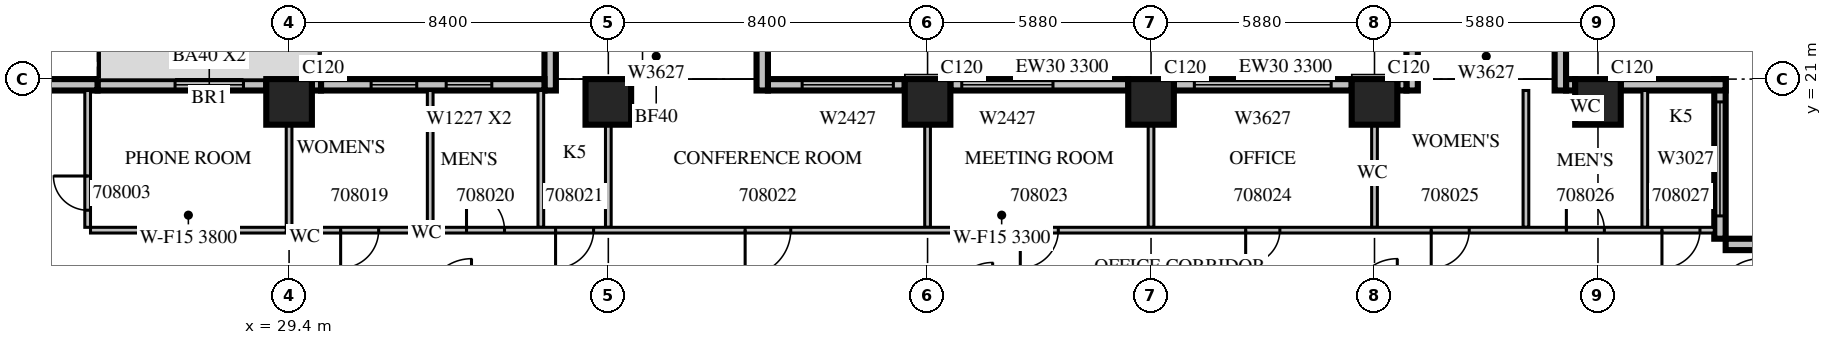
"""IFC4 building model, lengths in metres.
Left out: names, types, materials, properties, quantities, classifications, styles, units other than length and angle.
Written with IfcOpenShell. Run it as: python <this file> out.ifc"""

import sys

from ifc_helpers import new_model, si_unit, direction, frame, frame_2d, origin, origin_2d, place, context, subcontext, project, spatial, rectangle, extrude, source, transform, mapped, element, fill, save


model = new_model("IFC4")
c1 = context("Model", 3, precision=1e-05, world=origin(), true_north=direction((0.0, 1.0)))
c2 = subcontext(c1, "Body", "Model", "MODEL_VIEW")
j1 = project(units=[si_unit("LENGTHUNIT", "METRE"), si_unit("PLANEANGLEUNIT", "RADIAN")], contexts=[c1])
p1 = place(None, origin())
s1 = spatial("IfcSite", under=j1, at=p1, CompositionType="ELEMENT")
p2 = place(p1, origin())
s2 = spatial("IfcBuilding", under=s1, at=p2, CompositionType="ELEMENT")
p3 = place(p2, frame((0.0, 0.0, 44.7)))
s3 = spatial("IfcBuildingStorey", under=s2, at=p3, CompositionType="ELEMENT", Elevation=44.7)
m1 = source(origin(), c2, "Body", "SweptSolid", [
    extrude(rectangle(XDim=1.2, YDim=1.2, at=origin_2d()), origin(), (0.0, 0.0, 1.0), 4.2),
])
for number, where, z_axis, x_axis in (
    (1, (29.4, 20.4, 0.0), (0.0, 0.0, 1.0), (1.0, 0.0, 0.0)),
    (2, (37.8, 20.4, 0.0), (0.0, 0.0, 1.0), (1.0, 0.0, 0.0)),
    (3, (46.2, 20.4, 0.0), (0.0, 0.0, 1.0), (1.0, 0.0, 0.0)),
    (4, (52.08, 20.4, 0.0), (0.0, 0.0, 1.0), (1.0, 0.0, 0.0)),
    (5, (57.96, 20.4, 0.0), (0.0, 0.0, 1.0), (1.0, 0.0, 0.0)),
    (6, (63.84, 20.4, 0.0), (0.0, 0.0, 1.0), (1.0, 0.0, 0.0)),
):
    element("IfcColumn", number, at=place(p3, frame(where, z_axis=z_axis, x_axis=x_axis)), inside=s3, PredefinedType="COLUMN", context=c2, shape_type="MappedRepresentation", body=[
        mapped(m1, transform((0.0, 0.0, 0.0), scale=1.0)),
    ])
m2 = source(origin(), c2, "Body", "SweptSolid", [
    extrude(rectangle(XDim=4.2, YDim=0.3, at=frame_2d((2.1, 0.0))), origin(), (0.0, 0.0, 1.0), 3.8),
])
p4 = place(p3, frame((71.4, 16.65, 0.0), z_axis=(0.0, 0.0, 1.0), x_axis=(-1.0, 0.0, 0.0)))
e7 = element("IfcWall", 7, at=p4, inside=s3, PredefinedType="STANDARD", context=c2, shape_type="MappedRepresentation", body=[
    mapped(m2, transform((0.0, 0.0, 0.0), scale=1.0)),
])
m3 = source(origin(), c2, "Body", "SweptSolid", [
    extrude(rectangle(XDim=1.2, YDim=2.7, at=frame_2d((0.6, 1.35))), frame((0.0, 0.16, 0.0), z_axis=(0.0, -1.0, 0.0), x_axis=(1.0, 0.0, 0.0)), (0.0, 0.0, 1.0), 0.32),
])
p5 = place(p4, frame((0.66, 0.0, 0.6)))
e8 = element("IfcOpeningElement", 8, at=p5, cuts=e7, PredefinedType="OPENING", context=c2, shape_type="MappedRepresentation", body=[
    mapped(m3, transform((0.0, 0.0, 0.0), scale=1.0)),
])
p6 = place(p3, frame((67.05, 16.8, 0.0), z_axis=(0.0, 0.0, 1.0), x_axis=(0.0, 1.0, 0.0)))
e9 = element("IfcWall", 9, at=p6, inside=s3, PredefinedType="STANDARD", context=c2, shape_type="MappedRepresentation", body=[
    mapped(m2, transform((0.0, 0.0, 0.0), scale=1.0)),
])
m4 = source(origin(), c2, "Body", "SweptSolid", [
    extrude(rectangle(XDim=3.0, YDim=2.7, at=frame_2d((1.5, 1.35))), frame((0.0, 0.16, 0.0), z_axis=(0.0, -1.0, 0.0), x_axis=(1.0, 0.0, 0.0)), (0.0, 0.0, 1.0), 0.32),
])
p7 = place(p6, frame((0.6, 0.0, 0.6)))
e10 = element("IfcOpeningElement", 10, at=p7, cuts=e9, PredefinedType="OPENING", context=c2, shape_type="MappedRepresentation", body=[
    mapped(m4, transform((0.0, 0.0, 0.0), scale=1.0)),
])
m5 = source(origin(), c2, "Body", "SweptSolid", [
    extrude(rectangle(XDim=2.76, YDim=0.3, at=frame_2d((1.38, 0.0))), origin(), (0.0, 0.0, 1.0), 3.8),
])
p8 = place(p3, frame((67.2, 20.85, 0.0), z_axis=(0.0, 0.0, 1.0), x_axis=(-1.0, 0.0, 0.0)))
e11 = element("IfcWall", 11, at=p8, inside=s3, PredefinedType="STANDARD", context=c2, shape_type="MappedRepresentation", body=[
    mapped(m5, transform((0.0, 0.0, 0.0), scale=1.0)),
])
m6 = source(origin(), c2, "Body", "SweptSolid", [
    extrude(rectangle(XDim=0.24, YDim=0.3, at=frame_2d((0.12, 0.0))), origin(), (0.0, 0.0, 1.0), 3.8),
])
p9 = place(p3, frame((63.24, 20.85, 0.0), z_axis=(0.0, 0.0, 1.0), x_axis=(-1.0, 0.0, 0.0)))
e12 = element("IfcWall", 12, at=p9, inside=s3, PredefinedType="STANDARD", context=c2, shape_type="MappedRepresentation", body=[
    mapped(m6, transform((0.0, 0.0, 0.0), scale=1.0)),
])
m7 = source(origin(), c2, "Body", "SweptSolid", [
    extrude(rectangle(XDim=1.2, YDim=0.3, at=frame_2d((0.6, 0.0))), origin(), (0.0, 0.0, 1.0), 3.8),
])
for number, where, z_axis, x_axis in (
    (13, (62.85, 20.7, 0.0), (0.0, 0.0, 1.0), (0.0, 1.0, 0.0)),
    (14, (58.95, 20.7, 0.0), (0.0, 0.0, 1.0), (0.0, 1.0, 0.0)),
):
    element("IfcWall", number, at=place(p3, frame(where, z_axis=z_axis, x_axis=x_axis)), inside=s3, PredefinedType="STANDARD", context=c2, shape_type="MappedRepresentation", body=[
        mapped(m7, transform((0.0, 0.0, 0.0), scale=1.0)),
    ])
p10 = place(p3, frame((58.8, 20.85, 0.0), z_axis=(0.0, 0.0, 1.0), x_axis=(-1.0, 0.0, 0.0)))
e15 = element("IfcWall", 15, at=p10, inside=s3, PredefinedType="STANDARD", context=c2, shape_type="MappedRepresentation", body=[
    mapped(m6, transform((0.0, 0.0, 0.0), scale=1.0)),
])
m8 = source(origin(), c2, "Body", "SweptSolid", [
    extrude(rectangle(XDim=4.68, YDim=0.3, at=frame_2d((2.34, 0.0))), origin(), (0.0, 0.0, 1.0), 3.3),
])
p11 = place(p3, frame((57.36, 20.85, 0.0), z_axis=(0.0, 0.0, 1.0), x_axis=(-1.0, 0.0, 0.0)))
e16 = element("IfcWall", 16, at=p11, inside=s3, PredefinedType="STANDARD", context=c2, shape_type="MappedRepresentation", body=[
    mapped(m8, transform((0.0, 0.0, 0.0), scale=1.0)),
])
m9 = source(origin(), c2, "Body", "SweptSolid", [
    extrude(rectangle(XDim=3.6, YDim=2.7, at=frame_2d((1.8, 1.35))), frame((0.0, 0.16, 0.0), z_axis=(0.0, -1.0, 0.0), x_axis=(1.0, 0.0, 0.0)), (0.0, 0.0, 1.0), 0.32),
])
p12 = place(p11, frame((0.54, 0.0, 0.6)))
e17 = element("IfcOpeningElement", 17, at=p12, cuts=e16, PredefinedType="OPENING", context=c2, shape_type="MappedRepresentation", body=[
    mapped(m9, transform((0.0, 0.0, 0.0), scale=1.0)),
])
p13 = place(p3, frame((51.48, 20.85, 0.0), z_axis=(0.0, 0.0, 1.0), x_axis=(-1.0, 0.0, 0.0)))
e18 = element("IfcWall", 18, at=p13, inside=s3, PredefinedType="STANDARD", context=c2, shape_type="MappedRepresentation", body=[
    mapped(m8, transform((0.0, 0.0, 0.0), scale=1.0)),
])
m10 = source(origin(), c2, "Body", "SweptSolid", [
    extrude(rectangle(XDim=2.4, YDim=2.7, at=frame_2d((1.2, 1.35))), frame((0.0, 0.16, 0.0), z_axis=(0.0, -1.0, 0.0), x_axis=(1.0, 0.0, 0.0)), (0.0, 0.0, 1.0), 0.32),
])
p14 = place(p13, frame((1.98, 0.0, 0.6)))
e19 = element("IfcOpeningElement", 19, at=p14, cuts=e18, PredefinedType="OPENING", context=c2, shape_type="MappedRepresentation", body=[
    mapped(m10, transform((0.0, 0.0, 0.0), scale=1.0)),
])
m11 = source(origin(), c2, "Body", "SweptSolid", [
    extrude(rectangle(XDim=3.6, YDim=0.3, at=frame_2d((1.8, 0.0))), origin(), (0.0, 0.0, 1.0), 3.8),
])
p15 = place(p3, frame((45.6, 20.85, 0.0), z_axis=(0.0, 0.0, 1.0), x_axis=(-1.0, 0.0, 0.0)))
e20 = element("IfcWall", 20, at=p15, inside=s3, PredefinedType="STANDARD", context=c2, shape_type="MappedRepresentation", body=[
    mapped(m11, transform((0.0, 0.0, 0.0), scale=1.0)),
])
p16 = place(p15, frame((0.3, 0.0, 0.6)))
e21 = element("IfcOpeningElement", 21, at=p16, cuts=e20, PredefinedType="OPENING", context=c2, shape_type="MappedRepresentation", body=[
    mapped(m10, transform((0.0, 0.0, 0.0), scale=1.0)),
])
for number, where, z_axis, x_axis in (
    (22, (41.85, 20.7, 0.0), (0.0, 0.0, 1.0), (0.0, 1.0, 0.0)),
    (23, (36.27, 20.7, 0.0), (0.0, 0.0, 1.0), (0.0, 1.0, 0.0)),
):
    element("IfcWall", number, at=place(p3, frame(where, z_axis=z_axis, x_axis=x_axis)), inside=s3, PredefinedType="STANDARD", context=c2, shape_type="MappedRepresentation", body=[
        mapped(m7, transform((0.0, 0.0, 0.0), scale=1.0)),
    ])
m12 = source(origin(), c2, "Body", "SweptSolid", [
    extrude(rectangle(XDim=5.88, YDim=0.3, at=frame_2d((2.94, 0.0))), origin(), (0.0, 0.0, 1.0), 3.8),
])
p17 = place(p3, frame((36.12, 20.85, 0.0), z_axis=(0.0, 0.0, 1.0), x_axis=(-1.0, 0.0, 0.0)))
e24 = element("IfcWall", 24, at=p17, inside=s3, PredefinedType="STANDARD", context=c2, shape_type="MappedRepresentation", body=[
    mapped(m12, transform((0.0, 0.0, 0.0), scale=1.0)),
])
p18 = place(p17, frame((1.386, 0.0, 0.6)))
e25 = element("IfcOpeningElement", 25, at=p18, cuts=e24, PredefinedType="OPENING", context=c2, shape_type="MappedRepresentation", body=[
    mapped(m3, transform((0.0, 0.0, 0.0), scale=1.0)),
])
p19 = place(p17, frame((3.361, 0.0, 0.6)))
e26 = element("IfcOpeningElement", 26, at=p19, cuts=e24, PredefinedType="OPENING", context=c2, shape_type="MappedRepresentation", body=[
    mapped(m3, transform((0.0, 0.0, 0.0), scale=1.0)),
])
p20 = place(p3, frame((30.24, 20.85, 0.0), z_axis=(0.0, 0.0, 1.0), x_axis=(-1.0, 0.0, 0.0)))
e27 = element("IfcWall", 27, at=p20, inside=s3, PredefinedType="STANDARD", context=c2, shape_type="MappedRepresentation", body=[
    mapped(m6, transform((0.0, 0.0, 0.0), scale=1.0)),
])
p21 = place(p3, frame((28.8, 20.85, 0.0), z_axis=(0.0, 0.0, 1.0), x_axis=(-1.0, 0.0, 0.0)))
e28 = element("IfcWall", 28, at=p21, inside=s3, PredefinedType="STANDARD", context=c2, shape_type="SweptSolid", body=[
    extrude(rectangle(XDim=4.44, YDim=0.3, at=frame_2d((2.22, 0.0))), origin(), (0.0, 0.0, 1.0), 3.8),
])
m13 = source(origin(), c2, "Body", "SweptSolid", [
    extrude(rectangle(XDim=1.8, YDim=2.4, at=frame_2d((0.9, 1.2))), frame((0.0, 0.16, 0.0), z_axis=(0.0, -1.0, 0.0), x_axis=(1.0, 0.0, 0.0)), (0.0, 0.0, 1.0), 0.32),
])
p22 = place(p21, frame((0.6, 0.0, 0.0)))
e29 = element("IfcOpeningElement", 29, at=p22, cuts=e28, PredefinedType="OPENING", context=c2, shape_type="MappedRepresentation", body=[
    mapped(m13, transform((0.0, 0.0, 0.0), scale=1.0)),
])
m14 = source(origin(), c2, "Body", "SweptSolid", [
    extrude(rectangle(XDim=2.16, YDim=0.3, at=frame_2d((1.08, 0.0))), origin(), (0.0, 0.0, 1.0), 3.8),
])
p23 = place(p3, frame((24.36, 20.85, 0.0), z_axis=(0.0, 0.0, 1.0), x_axis=(-1.0, 0.0, 0.0)))
e30 = element("IfcWall", 30, at=p23, inside=s3, PredefinedType="STANDARD", context=c2, shape_type="MappedRepresentation", body=[
    mapped(m14, transform((0.0, 0.0, 0.0), scale=1.0)),
])
m15 = source(origin(), c2, "Body", "SweptSolid", [
    extrude(rectangle(XDim=3.6, YDim=0.15, at=frame_2d((1.8, 0.0))), origin(), (0.0, 0.0, 1.0), 3.8),
])
p24 = place(p3, frame((24.1, 20.7, 0.0), z_axis=(0.0, 0.0, 1.0), x_axis=(0.0, -1.0, 0.0)))
e31 = element("IfcWall", 31, at=p24, inside=s3, PredefinedType="PARTITIONING", context=c2, shape_type="MappedRepresentation", body=[
    mapped(m15, transform((0.0, 0.0, 0.0), scale=1.0)),
])
m16 = source(origin(), c2, "Body", "SweptSolid", [
    extrude(rectangle(XDim=0.9, YDim=2.1, at=frame_2d((0.45, 1.05))), frame((0.0, 0.085, 0.0), z_axis=(0.0, -1.0, 0.0), x_axis=(1.0, 0.0, 0.0)), (0.0, 0.0, 1.0), 0.17),
])
p25 = place(p24, frame((2.25, 0.0, 0.0)))
e32 = element("IfcOpeningElement", 32, at=p25, cuts=e31, PredefinedType="OPENING", context=c2, shape_type="MappedRepresentation", body=[
    mapped(m16, transform((0.0, 0.0, 0.0), scale=1.0)),
])
m17 = source(origin(), c2, "Body", "SweptSolid", [
    extrude(rectangle(XDim=5.15, YDim=0.15, at=frame_2d((2.575, 0.0))), origin(), (0.0, 0.0, 1.0), 3.8),
])
p26 = place(p3, frame((24.175, 17.025, 0.0), z_axis=(0.0, 0.0, 1.0), x_axis=(1.0, 0.0, 0.0)))
e33 = element("IfcWall", 33, at=p26, inside=s3, PredefinedType="PARTITIONING", context=c2, shape_type="MappedRepresentation", body=[
    mapped(m17, transform((0.0, 0.0, 0.0), scale=1.0)),
])
m18 = source(origin(), c2, "Body", "SweptSolid", [
    extrude(rectangle(XDim=2.701, YDim=0.15, at=frame_2d((1.351, 0.0))), origin(), (0.0, 0.0, 1.0), 3.8),
])
p27 = place(p3, frame((29.4, 17.1, 0.0), z_axis=(0.0, 0.0, 1.0), x_axis=(0.0, 1.0, 0.0)))
e34 = element("IfcWall", 34, at=p27, inside=s3, PredefinedType="PARTITIONING", context=c2, shape_type="MappedRepresentation", body=[
    mapped(m18, transform((0.0, 0.0, 0.0), scale=1.0)),
])
for number, where, z_axis, x_axis in (
    (35, (33.113, 20.7, 0.0), (0.0, 0.0, 1.0), (0.0, -1.0, 0.0)),
    (36, (36.024, 20.7, 0.0), (0.0, 0.0, 1.0), (0.0, -1.0, 0.0)),
    (37, (61.944, 20.7, 0.0), (0.0, 0.0, 1.0), (0.0, -1.0, 0.0)),
    (38, (65.072, 20.7, 0.0), (0.0, 0.0, 1.0), (0.0, -1.0, 0.0)),
):
    element("IfcWall", number, at=place(p3, frame(where, z_axis=z_axis, x_axis=x_axis)), inside=s3, PredefinedType="PARTITIONING", context=c2, shape_type="MappedRepresentation", body=[
        mapped(m15, transform((0.0, 0.0, 0.0), scale=1.0)),
    ])
for number, where, z_axis, x_axis in (
    (39, (37.8, 17.1, 0.0), (0.0, 0.0, 1.0), (0.0, 1.0, 0.0)),
    (40, (46.2, 17.1, 0.0), (0.0, 0.0, 1.0), (0.0, 1.0, 0.0)),
    (41, (52.08, 17.1, 0.0), (0.0, 0.0, 1.0), (0.0, 1.0, 0.0)),
    (42, (57.96, 17.1, 0.0), (0.0, 0.0, 1.0), (0.0, 1.0, 0.0)),
):
    element("IfcWall", number, at=place(p3, frame(where, z_axis=z_axis, x_axis=x_axis)), inside=s3, PredefinedType="PARTITIONING", context=c2, shape_type="MappedRepresentation", body=[
        mapped(m18, transform((0.0, 0.0, 0.0), scale=1.0)),
    ])
p28 = place(p3, frame((29.4, 17.025, 0.0), z_axis=(0.0, 0.0, 1.0), x_axis=(1.0, 0.0, 0.0)))
e43 = element("IfcWall", 43, at=p28, inside=s3, PredefinedType="PARTITIONING", context=c2, shape_type="SweptSolid", body=[
    extrude(rectangle(XDim=37.5, YDim=0.15, at=frame_2d((18.75, 0.0))), origin(), (0.0, 0.0, 1.0), 3.3),
])
m19 = source(origin(), c2, "Body", "SweptSolid", [
    extrude(rectangle(XDim=1.0, YDim=2.1, at=frame_2d((0.5, 1.05))), frame((0.0, 0.085, 0.0), z_axis=(0.0, -1.0, 0.0), x_axis=(1.0, 0.0, 0.0)), (0.0, 0.0, 1.0), 0.17),
])
p29 = place(p28, frame((1.357, 0.0, 0.0)))
e44 = element("IfcOpeningElement", 44, at=p29, cuts=e43, PredefinedType="OPENING", context=c2, shape_type="MappedRepresentation", body=[
    mapped(m19, transform((0.0, 0.0, 0.0), scale=1.0)),
])
p30 = place(p28, frame((4.669, 0.0, 0.0)))
e45 = element("IfcOpeningElement", 45, at=p30, cuts=e43, PredefinedType="OPENING", context=c2, shape_type="MappedRepresentation", body=[
    mapped(m19, transform((0.0, 0.0, 0.0), scale=1.0)),
])
p31 = place(p28, frame((7.012, 0.0, 0.0)))
e46 = element("IfcOpeningElement", 46, at=p31, cuts=e43, PredefinedType="OPENING", context=c2, shape_type="MappedRepresentation", body=[
    mapped(m19, transform((0.0, 0.0, 0.0), scale=1.0)),
])
m20 = source(origin(), c2, "Body", "SweptSolid", [
    extrude(rectangle(XDim=1.2, YDim=2.1, at=frame_2d((0.6, 1.05))), frame((0.0, 0.085, 0.0), z_axis=(0.0, -1.0, 0.0), x_axis=(1.0, 0.0, 0.0)), (0.0, 0.0, 1.0), 0.17),
])
p32 = place(p28, frame((12.0, 0.0, 0.0)))
e47 = element("IfcOpeningElement", 47, at=p32, cuts=e43, PredefinedType="OPENING", context=c2, shape_type="MappedRepresentation", body=[
    mapped(m20, transform((0.0, 0.0, 0.0), scale=1.0)),
])
p33 = place(p28, frame((19.24, 0.0, 0.0)))
e48 = element("IfcOpeningElement", 48, at=p33, cuts=e43, PredefinedType="OPENING", context=c2, shape_type="MappedRepresentation", body=[
    mapped(m19, transform((0.0, 0.0, 0.0), scale=1.0)),
])
p34 = place(p28, frame((25.17, 0.0, 0.0)))
e49 = element("IfcOpeningElement", 49, at=p34, cuts=e43, PredefinedType="OPENING", context=c2, shape_type="MappedRepresentation", body=[
    mapped(m16, transform((0.0, 0.0, 0.0), scale=1.0)),
])
p35 = place(p28, frame((30.052, 0.0, 0.0)))
e50 = element("IfcOpeningElement", 50, at=p35, cuts=e43, PredefinedType="OPENING", context=c2, shape_type="MappedRepresentation", body=[
    mapped(m19, transform((0.0, 0.0, 0.0), scale=1.0)),
])
p36 = place(p28, frame((33.608, 0.0, 0.0)))
e51 = element("IfcOpeningElement", 51, at=p36, cuts=e43, PredefinedType="OPENING", context=c2, shape_type="MappedRepresentation", body=[
    mapped(m19, transform((0.0, 0.0, 0.0), scale=1.0)),
])
p37 = place(p28, frame((36.124, 0.0, 0.0)))
e52 = element("IfcOpeningElement", 52, at=p37, cuts=e43, PredefinedType="OPENING", context=c2, shape_type="MappedRepresentation", body=[
    mapped(m19, transform((0.0, 0.0, 0.0), scale=1.0)),
])
m21 = source(origin(), c2, "Body", "SweptSolid", [
    extrude(rectangle(XDim=3.0, YDim=2.7, at=frame_2d((1.5, 1.35))), frame((0.0, 0.03, 0.0), z_axis=(0.0, -1.0, 0.0), x_axis=(1.0, 0.0, 0.0)), (0.0, 0.0, 1.0), 0.06),
])
p38 = place(p7, origin())
e53 = element("IfcWindow", 53, at=p38, inside=s3, PartitioningType="SINGLE_PANEL", PredefinedType="WINDOW", context=c2, shape_type="MappedRepresentation", body=[
    mapped(m21, transform((0.0, 0.0, 0.0), scale=1.0)),
])
fill(e10, e53)
m22 = source(origin(), c2, "Body", "SweptSolid", [
    extrude(rectangle(XDim=2.4, YDim=2.7, at=frame_2d((1.2, 1.35))), frame((0.0, 0.03, 0.0), z_axis=(0.0, -1.0, 0.0), x_axis=(1.0, 0.0, 0.0)), (0.0, 0.0, 1.0), 0.06),
])
p39 = place(p14, origin())
e54 = element("IfcWindow", 54, at=p39, inside=s3, PartitioningType="SINGLE_PANEL", PredefinedType="WINDOW", context=c2, shape_type="MappedRepresentation", body=[
    mapped(m22, transform((0.0, 0.0, 0.0), scale=1.0)),
])
fill(e19, e54)
m23 = source(origin(), c2, "Body", "SweptSolid", [
    extrude(rectangle(XDim=3.6, YDim=2.7, at=frame_2d((1.8, 1.35))), frame((0.0, 0.03, 0.0), z_axis=(0.0, -1.0, 0.0), x_axis=(1.0, 0.0, 0.0)), (0.0, 0.0, 1.0), 0.06),
])
p40 = place(p12, origin())
e55 = element("IfcWindow", 55, at=p40, inside=s3, PartitioningType="SINGLE_PANEL", PredefinedType="WINDOW", context=c2, shape_type="MappedRepresentation", body=[
    mapped(m23, transform((0.0, 0.0, 0.0), scale=1.0)),
])
fill(e17, e55)
p41 = place(p16, origin())
e56 = element("IfcWindow", 56, at=p41, inside=s3, PartitioningType="SINGLE_PANEL", PredefinedType="WINDOW", context=c2, shape_type="MappedRepresentation", body=[
    mapped(m22, transform((0.0, 0.0, 0.0), scale=1.0)),
])
fill(e21, e56)
m24 = source(origin(), c2, "Body", "SweptSolid", [
    extrude(rectangle(XDim=1.2, YDim=2.7, at=frame_2d((0.6, 1.35))), frame((0.0, 0.03, 0.0), z_axis=(0.0, -1.0, 0.0), x_axis=(1.0, 0.0, 0.0)), (0.0, 0.0, 1.0), 0.06),
])
p42 = place(p18, origin())
e57 = element("IfcWindow", 57, at=p42, inside=s3, PartitioningType="SINGLE_PANEL", PredefinedType="WINDOW", context=c2, shape_type="MappedRepresentation", body=[
    mapped(m24, transform((0.0, 0.0, 0.0), scale=1.0)),
])
fill(e25, e57)
p43 = place(p19, origin())
e58 = element("IfcWindow", 58, at=p43, inside=s3, PartitioningType="SINGLE_PANEL", PredefinedType="WINDOW", context=c2, shape_type="MappedRepresentation", body=[
    mapped(m24, transform((0.0, 0.0, 0.0), scale=1.0)),
])
fill(e26, e58)
m25 = source(origin(), c2, "Body", "SweptSolid", [
    extrude(rectangle(XDim=1.8, YDim=2.4, at=frame_2d((0.9, 1.2))), frame((0.0, 0.025, 0.0), z_axis=(0.0, -1.0, 0.0), x_axis=(1.0, 0.0, 0.0)), (0.0, 0.0, 1.0), 0.05),
])
p44 = place(p22, origin())
e59 = element("IfcDoor", 59, at=p44, inside=s3, OperationType="SLIDING_TO_LEFT", PredefinedType="DOOR", context=c2, shape_type="MappedRepresentation", body=[
    mapped(m25, transform((0.0, 0.0, 0.0), scale=1.0)),
])
fill(e29, e59)
m26 = source(origin(), c2, "Body", "SweptSolid", [
    extrude(rectangle(XDim=0.9, YDim=2.1, at=frame_2d((0.45, 1.05))), frame((0.0, 0.025, 0.0), z_axis=(0.0, -1.0, 0.0), x_axis=(1.0, 0.0, 0.0)), (0.0, 0.0, 1.0), 0.05),
])
p45 = place(p25, origin())
e60 = element("IfcDoor", 60, at=p45, inside=s3, OperationType="SINGLE_SWING_RIGHT", PredefinedType="DOOR", context=c2, shape_type="MappedRepresentation", body=[
    mapped(m26, transform((0.0, 0.0, 0.0), scale=1.0)),
])
fill(e32, e60)
m27 = source(origin(), c2, "Body", "SweptSolid", [
    extrude(rectangle(XDim=1.0, YDim=2.1, at=frame_2d((0.5, 1.05))), frame((0.0, 0.025, 0.0), z_axis=(0.0, -1.0, 0.0), x_axis=(1.0, 0.0, 0.0)), (0.0, 0.0, 1.0), 0.05),
])
p46 = place(p29, origin())
e61 = element("IfcDoor", 61, at=p46, inside=s3, OperationType="SINGLE_SWING_RIGHT", PredefinedType="DOOR", context=c2, shape_type="MappedRepresentation", body=[
    mapped(m27, transform((0.0, 0.0, 0.0), scale=1.0)),
])
fill(e44, e61)
p47 = place(p30, origin())
e62 = element("IfcDoor", 62, at=p47, inside=s3, OperationType="SINGLE_SWING_LEFT", PredefinedType="DOOR", context=c2, shape_type="MappedRepresentation", body=[
    mapped(m27, transform((0.0, 0.0, 0.0), scale=1.0)),
])
fill(e45, e62)
p48 = place(p31, origin())
e63 = element("IfcDoor", 63, at=p48, inside=s3, OperationType="SINGLE_SWING_RIGHT", PredefinedType="DOOR", context=c2, shape_type="MappedRepresentation", body=[
    mapped(m27, transform((0.0, 0.0, 0.0), scale=1.0)),
])
fill(e46, e63)
m28 = source(origin(), c2, "Body", "SweptSolid", [
    extrude(rectangle(XDim=1.2, YDim=2.1, at=frame_2d((0.6, 1.05))), frame((0.0, 0.025, 0.0), z_axis=(0.0, -1.0, 0.0), x_axis=(1.0, 0.0, 0.0)), (0.0, 0.0, 1.0), 0.05),
])
p49 = place(p32, origin())
e64 = element("IfcDoor", 64, at=p49, inside=s3, OperationType="SINGLE_SWING_RIGHT", PredefinedType="DOOR", context=c2, shape_type="MappedRepresentation", body=[
    mapped(m28, transform((0.0, 0.0, 0.0), scale=1.0)),
])
fill(e47, e64)
p50 = place(p33, origin())
e65 = element("IfcDoor", 65, at=p50, inside=s3, OperationType="SINGLE_SWING_RIGHT", PredefinedType="DOOR", context=c2, shape_type="MappedRepresentation", body=[
    mapped(m27, transform((0.0, 0.0, 0.0), scale=1.0)),
])
fill(e48, e65)
p51 = place(p34, origin())
e66 = element("IfcDoor", 66, at=p51, inside=s3, OperationType="SINGLE_SWING_RIGHT", PredefinedType="DOOR", context=c2, shape_type="MappedRepresentation", body=[
    mapped(m26, transform((0.0, 0.0, 0.0), scale=1.0)),
])
fill(e49, e66)
p52 = place(p35, origin())
e67 = element("IfcDoor", 67, at=p52, inside=s3, OperationType="SINGLE_SWING_RIGHT", PredefinedType="DOOR", context=c2, shape_type="MappedRepresentation", body=[
    mapped(m27, transform((0.0, 0.0, 0.0), scale=1.0)),
])
fill(e50, e67)
p53 = place(p36, origin())
e68 = element("IfcDoor", 68, at=p53, inside=s3, OperationType="SINGLE_SWING_LEFT", PredefinedType="DOOR", context=c2, shape_type="MappedRepresentation", body=[
    mapped(m27, transform((0.0, 0.0, 0.0), scale=1.0)),
])
fill(e51, e68)
p54 = place(p37, origin())
e69 = element("IfcDoor", 69, at=p54, inside=s3, OperationType="SINGLE_SWING_RIGHT", PredefinedType="DOOR", context=c2, shape_type="MappedRepresentation", body=[
    mapped(m27, transform((0.0, 0.0, 0.0), scale=1.0)),
])
fill(e52, e69)
save(model, sys.argv[1])
